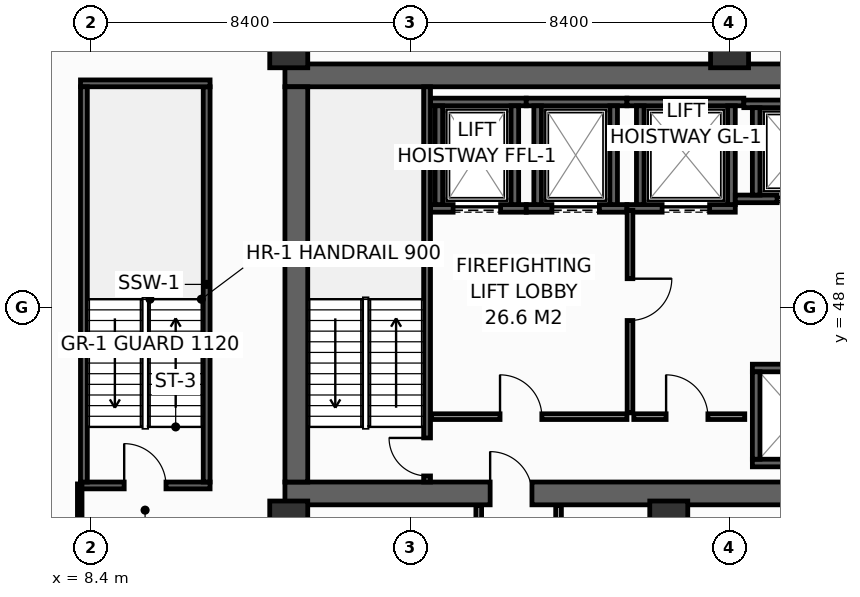
"""IFC4 building model, lengths in metres.
Left out: names, types, materials, properties, quantities, classifications, styles, units other than length and angle.
Written with IfcOpenShell. Run it as: python <this file> out.ifc"""

import sys

from ifc_helpers import new_model, si_unit, direction, frame, frame_2d, origin, origin_2d, place, context, subcontext, project, spatial, rectangle, hollow_rectangle, extrude, element, fill, save


model = new_model("IFC4")
c1 = context("Model", 3, precision=1e-05, world=origin(), true_north=direction((0.0, 1.0)))
c2 = subcontext(c1, "Body", "Model", "MODEL_VIEW")
j1 = project(units=[si_unit("LENGTHUNIT", "METRE"), si_unit("PLANEANGLEUNIT", "RADIAN")], contexts=[c1])
p1 = place(None, origin())
s1 = spatial("IfcSite", under=j1, at=p1, CompositionType="ELEMENT")
p2 = place(p1, origin())
s2 = spatial("IfcBuilding", under=s1, at=p2, CompositionType="ELEMENT")
p3 = place(p2, frame((0.0, 0.0, 110.4)))
s3 = spatial("IfcBuildingStorey", under=s2, at=p3, CompositionType="ELEMENT", Elevation=110.4)
p4 = place(p3, frame((13.5, 43.1, 0.0), z_axis=(0.0, 0.0, 1.0), x_axis=(1.0, 0.0, 0.0)))
e1 = element("IfcWall", 1, at=p4, inside=s3, PredefinedType="SHEAR", context=c2, shape_type="SweptSolid", body=[
    extrude(rectangle(XDim=32.9, YDim=0.6, at=frame_2d((16.45, 0.0))), origin(), (0.0, 0.0, 1.0), 4.15),
])
p5 = place(p4, frame((5.4, 0.0, 0.0)))
e2 = element("IfcOpeningElement", 2, at=p5, cuts=e1, PredefinedType="OPENING", context=c2, shape_type="SweptSolid", body=[
    extrude(rectangle(XDim=1.1, YDim=2.15, at=frame_2d((0.55, 1.075))), frame((0.0, 0.31, 0.0), z_axis=(0.0, -1.0, 0.0), x_axis=(1.0, 0.0, 0.0)), (0.0, 0.0, 1.0), 0.62),
])
p6 = place(p4, frame((25.6, 0.0, 0.0)))
e3 = element("IfcOpeningElement", 3, at=p6, cuts=e1, PredefinedType="OPENING", context=c2, shape_type="SweptSolid", body=[
    extrude(rectangle(XDim=1.1, YDim=2.15, at=frame_2d((0.55, 1.075))), frame((0.0, 0.31, 0.0), z_axis=(0.0, -1.0, 0.0), x_axis=(1.0, 0.0, 0.0)), (0.0, 0.0, 1.0), 0.62),
])
p7 = place(p3, frame((13.5, 54.1, 0.0), z_axis=(0.0, 0.0, 1.0), x_axis=(1.0, 0.0, 0.0)))
e4 = element("IfcWall", 4, at=p7, inside=s3, PredefinedType="SHEAR", context=c2, shape_type="SweptSolid", body=[
    extrude(rectangle(XDim=32.9, YDim=0.6, at=frame_2d((16.45, 0.0))), origin(), (0.0, 0.0, 1.0), 4.15),
])
p8 = place(p3, frame((13.8, 43.4, 0.0), z_axis=(0.0, 0.0, 1.0), x_axis=(0.0, 1.0, 0.0)))
e5 = element("IfcWall", 5, at=p8, inside=s3, PredefinedType="SHEAR", context=c2, shape_type="SweptSolid", body=[
    extrude(rectangle(XDim=10.4, YDim=0.6, at=frame_2d((5.2, 0.0))), origin(), (0.0, 0.0, 1.0), 4.15),
])
for number, where, z_axis, x_axis in (
    (6, (13.6, 54.8, 0.0), (0.0, 0.0, 1.0), (1.0, 0.0, 0.0)),
    (7, (25.2, 54.8, 0.0), (0.0, 0.0, 1.0), (1.0, 0.0, 0.0)),
    (8, (13.6, 42.4, 0.0), (0.0, 0.0, 1.0), (1.0, 0.0, 0.0)),
    (9, (23.6, 42.4, 0.0), (0.0, 0.0, 1.0), (1.0, 0.0, 0.0)),
):
    element("IfcColumn", number, at=place(p3, frame(where, z_axis=z_axis, x_axis=x_axis)), inside=s3, PredefinedType="COLUMN", context=c2, shape_type="SweptSolid", body=[
        extrude(hollow_rectangle(XDim=1.0, YDim=1.0, WallThickness=0.045, at=origin_2d()), origin(), (0.0, 0.0, 1.0), 4.4),
    ])
p9 = place(p3, frame((17.33, 50.6, 0.0), z_axis=(0.0, 0.0, 1.0), x_axis=(1.0, 0.0, 0.0)))
e10 = element("IfcWall", 10, at=p9, inside=s3, PredefinedType="SHEAR", context=c2, shape_type="SweptSolid", body=[
    extrude(rectangle(XDim=2.52, YDim=0.2, at=frame_2d((1.26, 0.0))), origin(), (0.0, 0.0, 1.0), 4.15),
])
p10 = place(p9, frame((0.595, 0.0, 0.0)))
e11 = element("IfcOpeningElement", 11, at=p10, cuts=e10, PredefinedType="OPENING", context=c2, shape_type="SweptSolid", body=[
    extrude(rectangle(XDim=1.25, YDim=2.3, at=frame_2d((0.625, 1.15))), frame((0.0, 0.11, 0.0), z_axis=(0.0, -1.0, 0.0), x_axis=(1.0, 0.0, 0.0)), (0.0, 0.0, 1.0), 0.22),
])
p11 = place(p3, frame((17.33, 53.4, 0.0), z_axis=(0.0, 0.0, 1.0), x_axis=(1.0, 0.0, 0.0)))
e12 = element("IfcWall", 12, at=p11, inside=s3, PredefinedType="SHEAR", context=c2, shape_type="SweptSolid", body=[
    extrude(rectangle(XDim=2.52, YDim=0.2, at=frame_2d((1.26, 0.0))), origin(), (0.0, 0.0, 1.0), 4.15),
])
for number, where, z_axis, x_axis in (
    (13, (17.55, 50.7, 0.0), (0.0, 0.0, 1.0), (0.0, 1.0, 0.0)),
    (14, (19.55, 50.7, 0.0), (0.0, 0.0, 1.0), (0.0, 1.0, 0.0)),
):
    element("IfcWall", number, at=place(p3, frame(where, z_axis=z_axis, x_axis=x_axis)), inside=s3, PredefinedType="SHEAR", context=c2, shape_type="SweptSolid", body=[
        extrude(rectangle(XDim=2.6, YDim=0.2, at=frame_2d((1.3, 0.0))), origin(), (0.0, 0.0, 1.0), 4.15),
    ])
p12 = place(p3, frame((19.85, 50.6, 0.0), z_axis=(0.0, 0.0, 1.0), x_axis=(1.0, 0.0, 0.0)))
e15 = element("IfcWall", 15, at=p12, inside=s3, PredefinedType="SHEAR", context=c2, shape_type="SweptSolid", body=[
    extrude(rectangle(XDim=2.65, YDim=0.2, at=frame_2d((1.325, 0.0))), origin(), (0.0, 0.0, 1.0), 4.15),
])
p13 = place(p12, frame((0.675, 0.0, 0.0)))
e16 = element("IfcOpeningElement", 16, at=p13, cuts=e15, PredefinedType="OPENING", context=c2, shape_type="SweptSolid", body=[
    extrude(rectangle(XDim=1.25, YDim=2.3, at=frame_2d((0.625, 1.15))), frame((0.0, 0.11, 0.0), z_axis=(0.0, -1.0, 0.0), x_axis=(1.0, 0.0, 0.0)), (0.0, 0.0, 1.0), 0.22),
])
p14 = place(p3, frame((19.85, 53.4, 0.0), z_axis=(0.0, 0.0, 1.0), x_axis=(1.0, 0.0, 0.0)))
e17 = element("IfcWall", 17, at=p14, inside=s3, PredefinedType="SHEAR", context=c2, shape_type="SweptSolid", body=[
    extrude(rectangle(XDim=2.65, YDim=0.2, at=frame_2d((1.325, 0.0))), origin(), (0.0, 0.0, 1.0), 4.15),
])
for number, where, z_axis, x_axis in (
    (18, (20.15, 50.7, 0.0), (0.0, 0.0, 1.0), (0.0, 1.0, 0.0)),
    (19, (22.15, 50.7, 0.0), (0.0, 0.0, 1.0), (0.0, 1.0, 0.0)),
):
    element("IfcWall", number, at=place(p3, frame(where, z_axis=z_axis, x_axis=x_axis)), inside=s3, PredefinedType="SHEAR", context=c2, shape_type="SweptSolid", body=[
        extrude(rectangle(XDim=2.6, YDim=0.2, at=frame_2d((1.3, 0.0))), origin(), (0.0, 0.0, 1.0), 4.15),
    ])
p15 = place(p3, frame((22.5, 50.6, 0.0), z_axis=(0.0, 0.0, 1.0), x_axis=(1.0, 0.0, 0.0)))
e20 = element("IfcWall", 20, at=p15, inside=s3, PredefinedType="SHEAR", context=c2, shape_type="SweptSolid", body=[
    extrude(rectangle(XDim=2.85, YDim=0.2, at=frame_2d((1.425, 0.0))), origin(), (0.0, 0.0, 1.0), 4.15),
])
p16 = place(p15, frame((0.925, 0.0, 0.0)))
e21 = element("IfcOpeningElement", 21, at=p16, cuts=e20, PredefinedType="OPENING", context=c2, shape_type="SweptSolid", body=[
    extrude(rectangle(XDim=1.25, YDim=2.3, at=frame_2d((0.625, 1.15))), frame((0.0, 0.11, 0.0), z_axis=(0.0, -1.0, 0.0), x_axis=(1.0, 0.0, 0.0)), (0.0, 0.0, 1.0), 0.22),
])
p17 = place(p3, frame((22.5, 53.4, 0.0), z_axis=(0.0, 0.0, 1.0), x_axis=(1.0, 0.0, 0.0)))
e22 = element("IfcWall", 22, at=p17, inside=s3, PredefinedType="SHEAR", context=c2, shape_type="SweptSolid", body=[
    extrude(rectangle(XDim=3.075, YDim=0.2, at=frame_2d((1.538, 0.0))), origin(), (0.0, 0.0, 1.0), 4.15),
])
for number, where, z_axis, x_axis in (
    (23, (22.85, 50.7, 0.0), (0.0, 0.0, 1.0), (0.0, 1.0, 0.0)),
    (24, (25.25, 50.7, 0.0), (0.0, 0.0, 1.0), (0.0, 1.0, 0.0)),
):
    element("IfcWall", number, at=place(p3, frame(where, z_axis=z_axis, x_axis=x_axis)), inside=s3, PredefinedType="SHEAR", context=c2, shape_type="SweptSolid", body=[
        extrude(rectangle(XDim=2.6, YDim=0.2, at=frame_2d((1.3, 0.0))), origin(), (0.0, 0.0, 1.0), 4.15),
    ])
p18 = place(p3, frame((25.35, 50.85, 0.0), z_axis=(0.0, 0.0, 1.0), x_axis=(1.0, 0.0, 0.0)))
e25 = element("IfcWall", 25, at=p18, inside=s3, PredefinedType="SHEAR", context=c2, shape_type="SweptSolid", body=[
    extrude(rectangle(XDim=3.025, YDim=0.2, at=frame_2d((1.512, 0.0))), origin(), (0.0, 0.0, 1.0), 4.15),
])
p19 = place(p18, frame((1.1, 0.0, 0.0)))
e26 = element("IfcOpeningElement", 26, at=p19, cuts=e25, PredefinedType="OPENING", context=c2, shape_type="SweptSolid", body=[
    extrude(rectangle(XDim=1.1, YDim=2.2, at=frame_2d((0.55, 1.1))), frame((0.0, 0.11, 0.0), z_axis=(0.0, -1.0, 0.0), x_axis=(1.0, 0.0, 0.0)), (0.0, 0.0, 1.0), 0.22),
])
p20 = place(p3, frame((25.575, 53.35, 0.0), z_axis=(0.0, 0.0, 1.0), x_axis=(1.0, 0.0, 0.0)))
e27 = element("IfcWall", 27, at=p20, inside=s3, PredefinedType="SHEAR", context=c2, shape_type="SweptSolid", body=[
    extrude(rectangle(XDim=2.8, YDim=0.2, at=frame_2d((1.4, 0.0))), origin(), (0.0, 0.0, 1.0), 4.15),
])
p21 = place(p3, frame((25.9, 50.95, 0.0), z_axis=(0.0, 0.0, 1.0), x_axis=(0.0, 1.0, 0.0)))
e28 = element("IfcWall", 28, at=p21, inside=s3, PredefinedType="SHEAR", context=c2, shape_type="SweptSolid", body=[
    extrude(rectangle(XDim=2.3, YDim=0.2, at=frame_2d((1.15, 0.0))), origin(), (0.0, 0.0, 1.0), 4.15),
])
for number, where, z_axis, x_axis in (
    (29, (25.8, 43.9, 0.0), (0.0, 0.0, 1.0), (1.0, 0.0, 0.0)),
    (30, (25.8, 46.4, 0.0), (0.0, 0.0, 1.0), (1.0, 0.0, 0.0)),
):
    element("IfcWall", number, at=place(p3, frame(where, z_axis=z_axis, x_axis=x_axis)), inside=s3, PredefinedType="SHEAR", context=c2, shape_type="SweptSolid", body=[
        extrude(rectangle(XDim=2.575, YDim=0.2, at=frame_2d((1.288, 0.0))), origin(), (0.0, 0.0, 1.0), 4.15),
    ])
p22 = place(p3, frame((25.9, 44.0, 0.0), z_axis=(0.0, 0.0, 1.0), x_axis=(0.0, 1.0, 0.0)))
e31 = element("IfcWall", 31, at=p22, inside=s3, PredefinedType="SHEAR", context=c2, shape_type="SweptSolid", body=[
    extrude(rectangle(XDim=2.3, YDim=0.2, at=frame_2d((1.15, 0.0))), origin(), (0.0, 0.0, 1.0), 4.15),
])
p23 = place(p3, frame((17.24, 43.4, 0.0), z_axis=(0.0, 0.0, 1.0), x_axis=(0.0, 1.0, 0.0)))
e32 = element("IfcWall", 32, at=p23, inside=s3, PredefinedType="SHEAR", context=c2, shape_type="SweptSolid", body=[
    extrude(rectangle(XDim=10.4, YDim=0.18, at=frame_2d((5.2, 0.0))), origin(), (0.0, 0.0, 1.0), 4.15),
])
p24 = place(p23, frame((0.16, 0.0, 0.0)))
e33 = element("IfcOpeningElement", 33, at=p24, cuts=e32, PredefinedType="OPENING", context=c2, shape_type="SweptSolid", body=[
    extrude(rectangle(XDim=1.0, YDim=2.15, at=frame_2d((0.5, 1.075))), frame((0.0, 0.1, 0.0), z_axis=(0.0, -1.0, 0.0), x_axis=(1.0, 0.0, 0.0)), (0.0, 0.0, 1.0), 0.2),
])
p25 = place(p3, frame((8.12, 43.31, 0.0), z_axis=(0.0, 0.0, 1.0), x_axis=(1.0, 0.0, 0.0)))
e34 = element("IfcWall", 34, at=p25, inside=s3, PredefinedType="SHEAR", context=c2, shape_type="SweptSolid", body=[
    extrude(rectangle(XDim=3.41, YDim=0.18, at=frame_2d((1.705, 0.0))), origin(), (0.0, 0.0, 1.0), 4.15),
])
p26 = place(p25, frame((1.15, 0.0, 0.0)))
e35 = element("IfcOpeningElement", 35, at=p26, cuts=e34, PredefinedType="OPENING", context=c2, shape_type="SweptSolid", body=[
    extrude(rectangle(XDim=1.1, YDim=2.15, at=frame_2d((0.55, 1.075))), frame((0.0, 0.1, 0.0), z_axis=(0.0, -1.0, 0.0), x_axis=(1.0, 0.0, 0.0)), (0.0, 0.0, 1.0), 0.2),
])
p27 = place(p3, frame((11.44, 43.4, 0.0), z_axis=(0.0, 0.0, 1.0), x_axis=(0.0, 1.0, 0.0)))
e36 = element("IfcWall", 36, at=p27, inside=s3, PredefinedType="SHEAR", context=c2, shape_type="SweptSolid", body=[
    extrude(rectangle(XDim=10.4, YDim=0.18, at=frame_2d((5.2, 0.0))), origin(), (0.0, 0.0, 1.0), 4.15),
])
p28 = place(p3, frame((11.53, 53.89, 0.0), z_axis=(0.0, 0.0, 1.0), x_axis=(-1.0, 0.0, 0.0)))
e37 = element("IfcWall", 37, at=p28, inside=s3, PredefinedType="SHEAR", context=c2, shape_type="SweptSolid", body=[
    extrude(rectangle(XDim=3.41, YDim=0.18, at=frame_2d((1.705, 0.0))), origin(), (0.0, 0.0, 1.0), 4.15),
])
p29 = place(p3, frame((8.21, 53.8, 0.0), z_axis=(0.0, 0.0, 1.0), x_axis=(0.0, -1.0, 0.0)))
e38 = element("IfcWall", 38, at=p29, inside=s3, PredefinedType="SHEAR", context=c2, shape_type="SweptSolid", body=[
    extrude(rectangle(XDim=10.4, YDim=0.18, at=frame_2d((5.2, 0.0))), origin(), (0.0, 0.0, 1.0), 4.15),
])
p30 = place(p3, frame((17.36, 45.12, 0.0), z_axis=(0.0, 0.0, 1.0), x_axis=(1.0, 0.0, 0.0)))
e39 = element("IfcWall", 39, at=p30, inside=s3, PredefinedType="PARTITIONING", context=c2, shape_type="SweptSolid", body=[
    extrude(rectangle(XDim=5.14, YDim=0.15, at=frame_2d((2.57, 0.0))), origin(), (0.0, 0.0, 1.0), 4.15),
])
p31 = place(p30, frame((1.8, 0.0, 0.0)))
e40 = element("IfcOpeningElement", 40, at=p31, cuts=e39, PredefinedType="OPENING", context=c2, shape_type="SweptSolid", body=[
    extrude(rectangle(XDim=1.1, YDim=2.15, at=frame_2d((0.55, 1.075))), frame((0.0, 0.085, 0.0), z_axis=(0.0, -1.0, 0.0), x_axis=(1.0, 0.0, 0.0)), (0.0, 0.0, 1.0), 0.17),
])
p32 = place(p3, frame((22.58, 50.55, 0.0), z_axis=(0.0, 0.0, 1.0), x_axis=(0.0, -1.0, 0.0)))
e41 = element("IfcWall", 41, at=p32, inside=s3, PredefinedType="PARTITIONING", context=c2, shape_type="SweptSolid", body=[
    extrude(rectangle(XDim=5.33, YDim=0.15, at=frame_2d((2.665, 0.0))), origin(), (0.0, 0.0, 1.0), 4.15),
])
p33 = place(p32, frame((1.8, 0.0, 0.0)))
e42 = element("IfcOpeningElement", 42, at=p33, cuts=e41, PredefinedType="OPENING", context=c2, shape_type="SweptSolid", body=[
    extrude(rectangle(XDim=1.1, YDim=2.15, at=frame_2d((0.55, 1.075))), frame((0.0, 0.085, 0.0), z_axis=(0.0, -1.0, 0.0), x_axis=(1.0, 0.0, 0.0)), (0.0, 0.0, 1.0), 0.17),
])
p34 = place(p3, frame((22.68, 45.12, 0.0), z_axis=(0.0, 0.0, 1.0), x_axis=(1.0, 0.0, 0.0)))
e43 = element("IfcWall", 43, at=p34, inside=s3, PredefinedType="PARTITIONING", context=c2, shape_type="SweptSolid", body=[
    extrude(rectangle(XDim=2.92, YDim=0.15, at=frame_2d((1.46, 0.0))), origin(), (0.0, 0.0, 1.0), 4.15),
])
p35 = place(p34, frame((0.85, 0.0, 0.0)))
e44 = element("IfcOpeningElement", 44, at=p35, cuts=e43, PredefinedType="OPENING", context=c2, shape_type="SweptSolid", body=[
    extrude(rectangle(XDim=1.1, YDim=2.15, at=frame_2d((0.55, 1.075))), frame((0.0, 0.085, 0.0), z_axis=(0.0, -1.0, 0.0), x_axis=(1.0, 0.0, 0.0)), (0.0, 0.0, 1.0), 0.17),
])
p36 = place(p3, frame((13.8, 41.23, 0.0), z_axis=(0.0, 0.0, 1.0), x_axis=(0.0, 1.0, 0.0)))
e45 = element("IfcWall", 45, at=p36, inside=s3, PredefinedType="PARTITIONING", context=c2, shape_type="SweptSolid", body=[
    extrude(rectangle(XDim=1.55, YDim=0.12, at=frame_2d((0.775, 0.0))), origin(), (0.0, 0.0, 1.0), 4.15),
])
p37 = place(p3, frame((8.1, 41.15, 0.0), z_axis=(0.0, 0.0, 1.0), x_axis=(0.0, 1.0, 0.0)))
e46 = element("IfcWall", 46, at=p37, inside=s3, PredefinedType="PARTITIONING", context=c2, shape_type="SweptSolid", body=[
    extrude(rectangle(XDim=2.2, YDim=0.12, at=frame_2d((1.1, 0.0))), origin(), (0.0, 0.0, 1.0), 3.335),
])
for number, where, z_axis, x_axis in (
    (47, (18.6, 41.15, 0.0), (0.0, 0.0, 1.0), (0.0, 1.0, 0.0)),
    (48, (20.7, 41.15, 0.0), (0.0, 0.0, 1.0), (0.0, 1.0, 0.0)),
):
    element("IfcWall", number, at=place(p3, frame(where, z_axis=z_axis, x_axis=x_axis)), inside=s3, PredefinedType="PARTITIONING", context=c2, shape_type="SweptSolid", body=[
        extrude(rectangle(XDim=1.63, YDim=0.15, at=frame_2d((0.815, 0.0))), origin(), (0.0, 0.0, 1.0), 4.15),
    ])
p38 = place(p10, origin())
e49 = element("IfcDoor", 49, at=p38, inside=s3, OperationType="SLIDING_TO_LEFT", PredefinedType="DOOR", context=c2, shape_type="SweptSolid", body=[
    extrude(rectangle(XDim=1.25, YDim=2.3, at=frame_2d((0.625, 1.15))), frame((0.0, 0.025, 0.0), z_axis=(0.0, -1.0, 0.0), x_axis=(1.0, 0.0, 0.0)), (0.0, 0.0, 1.0), 0.05),
])
fill(e11, e49)
p39 = place(p13, origin())
e50 = element("IfcDoor", 50, at=p39, inside=s3, OperationType="SLIDING_TO_LEFT", PredefinedType="DOOR", context=c2, shape_type="SweptSolid", body=[
    extrude(rectangle(XDim=1.25, YDim=2.3, at=frame_2d((0.625, 1.15))), frame((0.0, 0.025, 0.0), z_axis=(0.0, -1.0, 0.0), x_axis=(1.0, 0.0, 0.0)), (0.0, 0.0, 1.0), 0.05),
])
fill(e16, e50)
p40 = place(p16, origin())
e51 = element("IfcDoor", 51, at=p40, inside=s3, OperationType="SLIDING_TO_LEFT", PredefinedType="DOOR", context=c2, shape_type="SweptSolid", body=[
    extrude(rectangle(XDim=1.25, YDim=2.3, at=frame_2d((0.625, 1.15))), frame((0.0, 0.025, 0.0), z_axis=(0.0, -1.0, 0.0), x_axis=(1.0, 0.0, 0.0)), (0.0, 0.0, 1.0), 0.05),
])
fill(e21, e51)
p41 = place(p19, origin())
e52 = element("IfcDoor", 52, at=p41, inside=s3, OperationType="SLIDING_TO_LEFT", PredefinedType="DOOR", context=c2, shape_type="SweptSolid", body=[
    extrude(rectangle(XDim=1.1, YDim=2.2, at=frame_2d((0.55, 1.1))), frame((0.0, 0.025, 0.0), z_axis=(0.0, -1.0, 0.0), x_axis=(1.0, 0.0, 0.0)), (0.0, 0.0, 1.0), 0.05),
])
fill(e26, e52)
p42 = place(p24, origin())
e53 = element("IfcDoor", 53, at=p42, inside=s3, OperationType="SINGLE_SWING_RIGHT", PredefinedType="DOOR", context=c2, shape_type="SweptSolid", body=[
    extrude(rectangle(XDim=1.0, YDim=2.15, at=frame_2d((0.5, 1.075))), frame((0.0, 0.025, 0.0), z_axis=(0.0, -1.0, 0.0), x_axis=(1.0, 0.0, 0.0)), (0.0, 0.0, 1.0), 0.05),
])
fill(e33, e53)
p43 = place(p26, origin())
e54 = element("IfcDoor", 54, at=p43, inside=s3, OperationType="SINGLE_SWING_LEFT", PredefinedType="DOOR", context=c2, shape_type="SweptSolid", body=[
    extrude(rectangle(XDim=1.1, YDim=2.15, at=frame_2d((0.55, 1.075))), frame((0.0, 0.025, 0.0), z_axis=(0.0, -1.0, 0.0), x_axis=(1.0, 0.0, 0.0)), (0.0, 0.0, 1.0), 0.05),
])
fill(e35, e54)
p44 = place(p31, origin())
e55 = element("IfcDoor", 55, at=p44, inside=s3, OperationType="SINGLE_SWING_LEFT", PredefinedType="DOOR", context=c2, shape_type="SweptSolid", body=[
    extrude(rectangle(XDim=1.1, YDim=2.15, at=frame_2d((0.55, 1.075))), frame((0.0, 0.025, 0.0), z_axis=(0.0, -1.0, 0.0), x_axis=(1.0, 0.0, 0.0)), (0.0, 0.0, 1.0), 0.05),
])
fill(e40, e55)
p45 = place(p33, origin())
e56 = element("IfcDoor", 56, at=p45, inside=s3, OperationType="SINGLE_SWING_LEFT", PredefinedType="DOOR", context=c2, shape_type="SweptSolid", body=[
    extrude(rectangle(XDim=1.1, YDim=2.15, at=frame_2d((0.55, 1.075))), frame((0.0, 0.025, 0.0), z_axis=(0.0, -1.0, 0.0), x_axis=(1.0, 0.0, 0.0)), (0.0, 0.0, 1.0), 0.05),
])
fill(e42, e56)
p46 = place(p35, origin())
e57 = element("IfcDoor", 57, at=p46, inside=s3, OperationType="SINGLE_SWING_LEFT", PredefinedType="DOOR", context=c2, shape_type="SweptSolid", body=[
    extrude(rectangle(XDim=1.1, YDim=2.15, at=frame_2d((0.55, 1.075))), frame((0.0, 0.025, 0.0), z_axis=(0.0, -1.0, 0.0), x_axis=(1.0, 0.0, 0.0)), (0.0, 0.0, 1.0), 0.05),
])
fill(e44, e57)
p47 = place(p5, origin())
e58 = element("IfcDoor", 58, at=p47, inside=s3, OperationType="SINGLE_SWING_LEFT", PredefinedType="DOOR", context=c2, shape_type="SweptSolid", body=[
    extrude(rectangle(XDim=1.1, YDim=2.15, at=frame_2d((0.55, 1.075))), frame((0.0, 0.025, 0.0), z_axis=(0.0, -1.0, 0.0), x_axis=(1.0, 0.0, 0.0)), (0.0, 0.0, 1.0), 0.05),
])
fill(e2, e58)
save(model, sys.argv[1])
